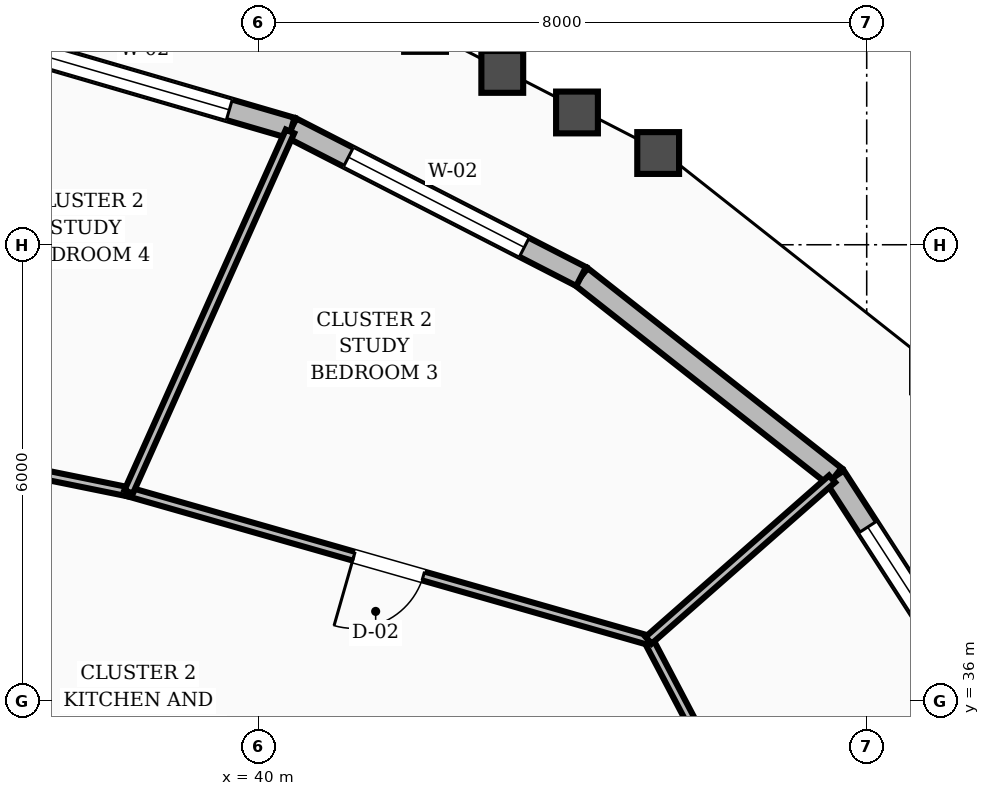
"""IFC4 building model, lengths in metres.
Left out: names, types, materials, properties, quantities, classifications, styles, units other than length and angle.
Written with IfcOpenShell. Run it as: python <this file> out.ifc"""

import sys

from ifc_helpers import new_model, si_unit, direction, frame, frame_2d, origin, place, context, subcontext, project, spatial, rectangle, extrude, element, fill, save


model = new_model("IFC4")
c1 = context("Model", 3, precision=1e-05, world=origin(), true_north=direction((0.0, 1.0)))
c2 = subcontext(c1, "Body", "Model", "MODEL_VIEW")
j1 = project(units=[si_unit("LENGTHUNIT", "METRE"), si_unit("PLANEANGLEUNIT", "RADIAN")], contexts=[c1])
p1 = place(None, origin())
s1 = spatial("IfcSite", under=j1, at=p1, CompositionType="ELEMENT")
p2 = place(p1, origin())
s2 = spatial("IfcBuilding", under=s1, at=p2, CompositionType="ELEMENT")
p3 = place(p2, frame((0.0, 0.0, 236.4)))
s3 = spatial("IfcBuildingStorey", under=s2, at=p3, CompositionType="ELEMENT", Elevation=236.4)
p4 = place(p3, frame((49.907, 35.36, 0.0), z_axis=(0.0, 0.0, 1.0), x_axis=(-0.543286759964, 0.839547197273, 0.0)))
e1 = element("IfcWall", 1, at=p4, inside=s3, PredefinedType="STANDARD", context=c2, shape_type="SweptSolid", body=[
    extrude(rectangle(XDim=4.279, YDim=0.28, at=frame_2d((2.14, 0.0))), origin(), (0.0, 0.0, 1.0), 2.88),
])
p5 = place(p4, frame((0.886, 0.0, 0.8)))
e2 = element("IfcOpeningElement", 2, at=p5, cuts=e1, PredefinedType="OPENING", context=c2, shape_type="SweptSolid", body=[
    extrude(rectangle(XDim=2.6, YDim=1.65, at=frame_2d((1.3, 0.825))), frame((0.0, 0.15, 0.0), z_axis=(0.0, -1.0, 0.0), x_axis=(1.0, 0.0, 0.0)), (0.0, 0.0, 1.0), 0.3),
])
p6 = place(p3, frame((47.582, 38.953, 0.0), z_axis=(0.0, 0.0, 1.0), x_axis=(-0.78564818009, 0.618673530322, 0.0)))
e3 = element("IfcWall", 3, at=p6, inside=s3, PredefinedType="STANDARD", context=c2, shape_type="SweptSolid", body=[
    extrude(rectangle(XDim=4.25, YDim=0.28, at=frame_2d((2.125, 0.0))), origin(), (0.0, 0.0, 1.0), 2.88),
])
p7 = place(p3, frame((44.243, 41.582, 0.0), z_axis=(0.0, 0.0, 1.0), x_axis=(-0.889784216581, 0.456381471933, 0.0)))
e4 = element("IfcWall", 4, at=p7, inside=s3, PredefinedType="STANDARD", context=c2, shape_type="SweptSolid", body=[
    extrude(rectangle(XDim=4.282, YDim=0.28, at=frame_2d((2.141, 0.0))), origin(), (0.0, 0.0, 1.0), 2.88),
])
p8 = place(p7, frame((0.841, 0.0, 0.8)))
e5 = element("IfcOpeningElement", 5, at=p8, cuts=e4, PredefinedType="OPENING", context=c2, shape_type="SweptSolid", body=[
    extrude(rectangle(XDim=2.6, YDim=1.65, at=frame_2d((1.3, 0.825))), frame((0.0, 0.15, 0.0), z_axis=(0.0, -1.0, 0.0), x_axis=(1.0, 0.0, 0.0)), (0.0, 0.0, 1.0), 0.3),
])
p9 = place(p3, frame((40.433, 43.536, 0.0), z_axis=(0.0, 0.0, 1.0), x_axis=(-0.960144675866, 0.279503490866, 0.0)))
e6 = element("IfcWall", 6, at=p9, inside=s3, PredefinedType="STANDARD", context=c2, shape_type="SweptSolid", body=[
    extrude(rectangle(XDim=4.305, YDim=0.28, at=frame_2d((2.153, 0.0))), origin(), (0.0, 0.0, 1.0), 2.88),
])
p10 = place(p9, frame((0.853, 0.0, 0.8)))
e7 = element("IfcOpeningElement", 7, at=p10, cuts=e6, PredefinedType="OPENING", context=c2, shape_type="SweptSolid", body=[
    extrude(rectangle(XDim=2.6, YDim=1.65, at=frame_2d((1.3, 0.825))), frame((0.0, 0.15, 0.0), z_axis=(0.0, -1.0, 0.0), x_axis=(1.0, 0.0, 0.0)), (0.0, 0.0, 1.0), 0.3),
])
p11 = place(p3, frame((48.382, 30.605, 0.0), z_axis=(0.0, 0.0, 1.0), x_axis=(-0.46497072963, 0.885326053264, 0.0)))
e8 = element("IfcWall", 8, at=p11, inside=s3, PredefinedType="PARTITIONING", context=c2, shape_type="SweptSolid", body=[
    extrude(rectangle(XDim=6.993, YDim=0.12, at=frame_2d((3.497, 0.0))), origin(), (0.0, 0.0, 1.0), 2.87),
])
p12 = place(p11, frame((3.021, 0.0, 0.0)))
e9 = element("IfcOpeningElement", 9, at=p12, cuts=e8, PredefinedType="OPENING", context=c2, shape_type="SweptSolid", body=[
    extrude(rectangle(XDim=0.95, YDim=2.1, at=frame_2d((0.475, 1.05))), frame((0.0, 0.07, 0.0), z_axis=(0.0, -1.0, 0.0), x_axis=(1.0, 0.0, 0.0)), (0.0, 0.0, 1.0), 0.14),
])
p13 = place(p3, frame((45.13, 36.796, 0.0), z_axis=(0.0, 0.0, 1.0), x_axis=(-0.961595149336, 0.274471799595, 0.0)))
e10 = element("IfcWall", 10, at=p13, inside=s3, PredefinedType="PARTITIONING", context=c2, shape_type="SweptSolid", body=[
    extrude(rectangle(XDim=7.113, YDim=0.12, at=frame_2d((3.557, 0.0))), origin(), (0.0, 0.0, 1.0), 2.87),
])
p14 = place(p13, frame((3.082, 0.0, 0.0)))
e11 = element("IfcOpeningElement", 11, at=p14, cuts=e10, PredefinedType="OPENING", context=c2, shape_type="SweptSolid", body=[
    extrude(rectangle(XDim=0.95, YDim=2.1, at=frame_2d((0.475, 1.05))), frame((0.0, 0.07, 0.0), z_axis=(0.0, -1.0, 0.0), x_axis=(1.0, 0.0, 0.0)), (0.0, 0.0, 1.0), 0.14),
])
p15 = place(p3, frame((45.13, 36.796, 0.0), z_axis=(0.0, 0.0, 1.0), x_axis=(0.750946942574, 0.66036254394, 0.0)))
e12 = element("IfcWall", 12, at=p15, inside=s3, PredefinedType="PARTITIONING", context=c2, shape_type="SweptSolid", body=[
    extrude(rectangle(XDim=3.215, YDim=0.12, at=frame_2d((1.608, 0.0))), origin(), (0.0, 0.0, 1.0), 2.87),
])
p16 = place(p3, frame((38.29, 38.749, 0.0), z_axis=(0.0, 0.0, 1.0), x_axis=(-0.9799449922, 0.199268191799, 0.0)))
e13 = element("IfcWall", 13, at=p16, inside=s3, PredefinedType="PARTITIONING", context=c2, shape_type="SweptSolid", body=[
    extrude(rectangle(XDim=3.201, YDim=0.12, at=frame_2d((1.601, 0.0))), origin(), (0.0, 0.0, 1.0), 2.87),
])
p17 = place(p16, frame((1.125, 0.0, 0.0)))
e14 = element("IfcOpeningElement", 14, at=p17, cuts=e13, PredefinedType="OPENING", context=c2, shape_type="SweptSolid", body=[
    extrude(rectangle(XDim=0.95, YDim=2.1, at=frame_2d((0.475, 1.05))), frame((0.0, 0.07, 0.0), z_axis=(0.0, -1.0, 0.0), x_axis=(1.0, 0.0, 0.0)), (0.0, 0.0, 1.0), 0.14),
])
p18 = place(p3, frame((38.29, 38.749, 0.0), z_axis=(0.0, 0.0, 1.0), x_axis=(0.408591704735, 0.912717272118, 0.0)))
e15 = element("IfcWall", 15, at=p18, inside=s3, PredefinedType="PARTITIONING", context=c2, shape_type="SweptSolid", body=[
    extrude(rectangle(XDim=5.195, YDim=0.12, at=frame_2d((2.598, 0.0))), origin(), (0.0, 0.0, 1.0), 2.87),
])
p19 = place(p5, origin())
e16 = element("IfcWindow", 16, at=p19, inside=s3, PartitioningType="SINGLE_PANEL", PredefinedType="WINDOW", context=c2, shape_type="SweptSolid", body=[
    extrude(rectangle(XDim=2.6, YDim=1.65, at=frame_2d((1.3, 0.825))), frame((0.0, 0.03, 0.0), z_axis=(0.0, -1.0, 0.0), x_axis=(1.0, 0.0, 0.0)), (0.0, 0.0, 1.0), 0.06),
])
fill(e2, e16)
p20 = place(p8, origin())
e17 = element("IfcWindow", 17, at=p20, inside=s3, PartitioningType="SINGLE_PANEL", PredefinedType="WINDOW", context=c2, shape_type="SweptSolid", body=[
    extrude(rectangle(XDim=2.6, YDim=1.65, at=frame_2d((1.3, 0.825))), frame((0.0, 0.03, 0.0), z_axis=(0.0, -1.0, 0.0), x_axis=(1.0, 0.0, 0.0)), (0.0, 0.0, 1.0), 0.06),
])
fill(e5, e17)
p21 = place(p10, origin())
e18 = element("IfcWindow", 18, at=p21, inside=s3, PartitioningType="SINGLE_PANEL", PredefinedType="WINDOW", context=c2, shape_type="SweptSolid", body=[
    extrude(rectangle(XDim=2.6, YDim=1.65, at=frame_2d((1.3, 0.825))), frame((0.0, 0.03, 0.0), z_axis=(0.0, -1.0, 0.0), x_axis=(1.0, 0.0, 0.0)), (0.0, 0.0, 1.0), 0.06),
])
fill(e7, e18)
p22 = place(p14, origin())
e19 = element("IfcDoor", 19, at=p22, inside=s3, OperationType="SINGLE_SWING_RIGHT", PredefinedType="DOOR", context=c2, shape_type="SweptSolid", body=[
    extrude(rectangle(XDim=0.95, YDim=2.1, at=frame_2d((0.475, 1.05))), frame((0.0, 0.025, 0.0), z_axis=(0.0, -1.0, 0.0), x_axis=(1.0, 0.0, 0.0)), (0.0, 0.0, 1.0), 0.05),
])
fill(e11, e19)
save(model, sys.argv[1])
